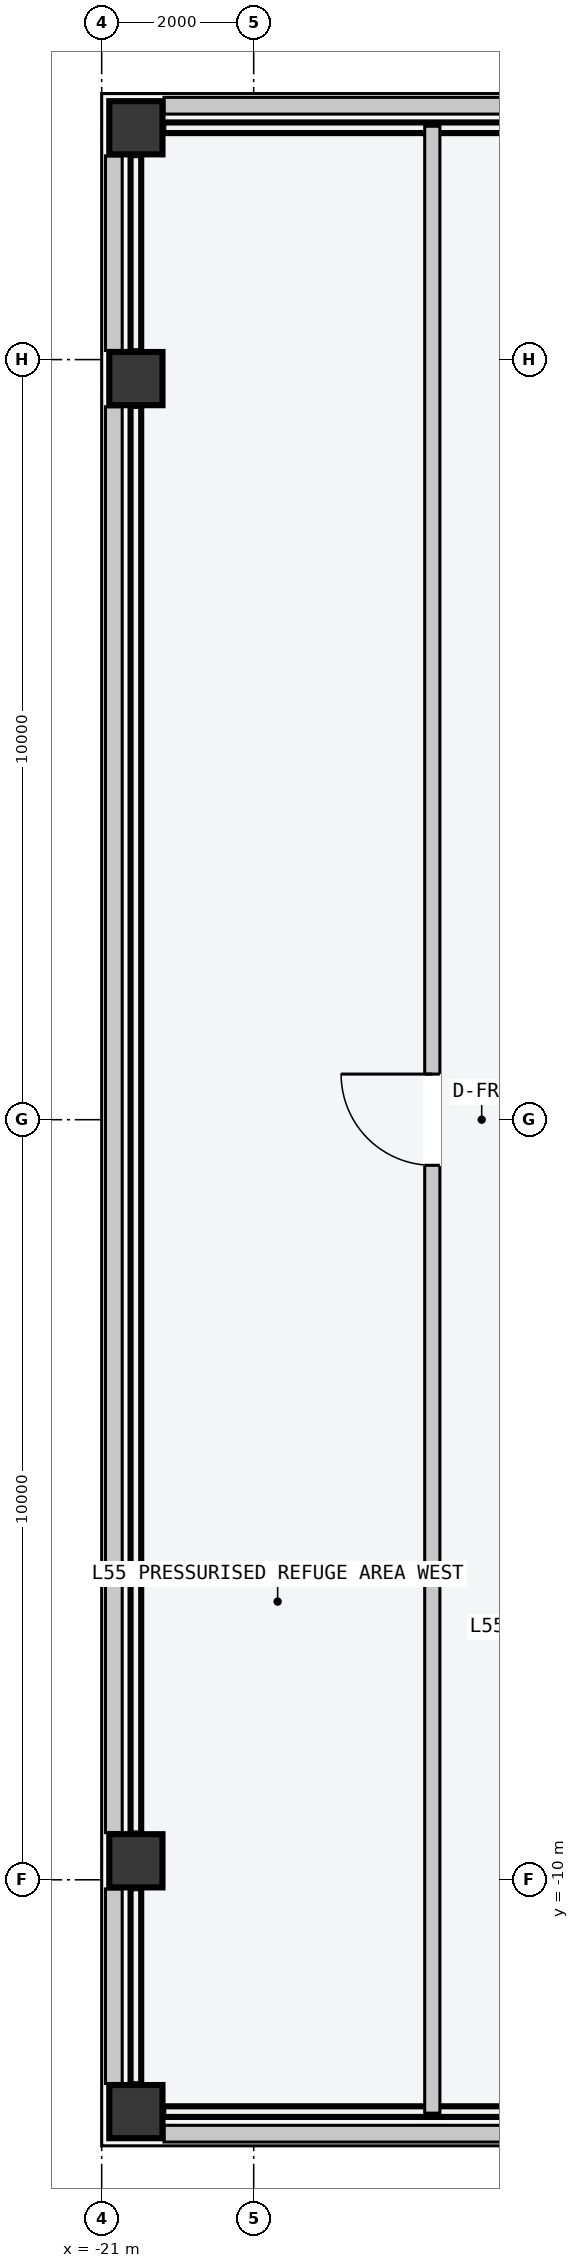
"""IFC4 building model, lengths in metres.
Left out: names, types, materials, properties, quantities, classifications, styles, units other than length and angle.
Written with IfcOpenShell. Run it as: python <this file> out.ifc"""

import sys

from ifc_helpers import new_model, si_unit, direction, frame, frame_2d, origin, origin_2d, place, context, subcontext, project, spatial, rectangle, hollow_rectangle, extrude, element, fill, save


model = new_model("IFC4")
c1 = context("Model", 3, precision=1e-05, world=origin(), true_north=direction((0.0, 1.0)))
c2 = subcontext(c1, "Body", "Model", "MODEL_VIEW")
j1 = project(units=[si_unit("LENGTHUNIT", "METRE"), si_unit("PLANEANGLEUNIT", "RADIAN")], contexts=[c1])
p1 = place(None, origin())
s1 = spatial("IfcSite", under=j1, at=p1, CompositionType="ELEMENT")
p2 = place(p1, origin())
s2 = spatial("IfcBuilding", under=s1, at=p2, CompositionType="ELEMENT")
p3 = place(p2, frame((0.0, 0.0, 209.1)))
s3 = spatial("IfcBuildingStorey", under=s2, at=p3, CompositionType="ELEMENT", Elevation=209.1)
for number, where, z_axis, x_axis in (
    (1, (-20.55, -13.05, 0.0), (0.0, 0.0, 1.0), (0.0, 1.0, 0.0)),
    (2, (-20.55, -9.75, 0.0), (0.0, 0.0, 1.0), (0.0, 1.0, 0.0)),
    (3, (-20.55, 9.75, 0.0), (0.0, 0.0, 1.0), (0.0, 1.0, 0.0)),
    (4, (-20.55, 13.05, 0.0), (0.0, 0.0, 1.0), (0.0, 1.0, 0.0)),
):
    element("IfcColumn", number, at=place(p3, frame(where, z_axis=z_axis, x_axis=x_axis)), inside=s3, PredefinedType="COLUMN", context=c2, shape_type="SweptSolid", body=[
        extrude(hollow_rectangle(XDim=0.7, YDim=0.7, WallThickness=0.03, at=origin_2d()), origin(), (0.0, 0.0, 1.0), 4.8),
    ])
p4 = place(p3, frame((-20.84, -12.68, 0.0), z_axis=(0.0, 0.0, 1.0), x_axis=(0.0, 1.0, 0.0)))
e5 = element("IfcWall", 5, at=p4, inside=s3, PredefinedType="PARAPET", context=c2, shape_type="SweptSolid", body=[
    extrude(rectangle(XDim=2.56, YDim=0.22, at=frame_2d((1.28, 0.0))), origin(), (0.0, 0.0, 1.0), 1.2),
])
p5 = place(p3, frame((-20.84, -9.38, 0.0), z_axis=(0.0, 0.0, 1.0), x_axis=(0.0, 1.0, 0.0)))
e6 = element("IfcWall", 6, at=p5, inside=s3, PredefinedType="PARAPET", context=c2, shape_type="SweptSolid", body=[
    extrude(rectangle(XDim=18.76, YDim=0.22, at=frame_2d((9.38, 0.0))), origin(), (0.0, 0.0, 1.0), 1.2),
])
p6 = place(p3, frame((-20.84, 10.12, 0.0), z_axis=(0.0, 0.0, 1.0), x_axis=(0.0, 1.0, 0.0)))
e7 = element("IfcWall", 7, at=p6, inside=s3, PredefinedType="PARAPET", context=c2, shape_type="SweptSolid", body=[
    extrude(rectangle(XDim=2.56, YDim=0.22, at=frame_2d((1.28, 0.0))), origin(), (0.0, 0.0, 1.0), 1.2),
])
for number, where, z_axis, x_axis in (
    (8, (-20.18, -13.34, 0.0), (0.0, 0.0, 1.0), (1.0, 0.0, 0.0)),
    (9, (-20.18, 13.34, 0.0), (0.0, 0.0, 1.0), (1.0, 0.0, 0.0)),
):
    element("IfcWall", number, at=place(p3, frame(where, z_axis=z_axis, x_axis=x_axis)), inside=s3, PredefinedType="PARAPET", context=c2, shape_type="SweptSolid", body=[
        extrude(rectangle(XDim=4.72, YDim=0.22, at=frame_2d((2.36, 0.0))), origin(), (0.0, 0.0, 1.0), 1.2),
    ])
p7 = place(p3, frame((-16.65, -13.07, 0.0), z_axis=(0.0, 0.0, 1.0), x_axis=(0.0, 1.0, 0.0)))
e10 = element("IfcWall", 10, at=p7, inside=s3, PredefinedType="PARTITIONING", context=c2, shape_type="SweptSolid", body=[
    extrude(rectangle(XDim=26.14, YDim=0.2, at=frame_2d((13.07, 0.0))), origin(), (0.0, 0.0, 1.0), 4.6),
])
p8 = place(p7, frame((12.47, 0.0, 0.0)))
e11 = element("IfcOpeningElement", 11, at=p8, cuts=e10, PredefinedType="OPENING", context=c2, shape_type="SweptSolid", body=[
    extrude(rectangle(XDim=1.2, YDim=2.22, at=frame_2d((0.6, 1.11))), frame((0.0, 0.11, 0.0), z_axis=(0.0, -1.0, 0.0), x_axis=(1.0, 0.0, 0.0)), (0.0, 0.0, 1.0), 0.22),
])
p9 = place(p8, origin())
e12 = element("IfcDoor", 12, at=p9, inside=s3, OperationType="SINGLE_SWING_RIGHT", PredefinedType="DOOR", context=c2, shape_type="SweptSolid", body=[
    extrude(rectangle(XDim=1.2, YDim=2.22, at=frame_2d((0.6, 1.11))), frame((0.0, 0.025, 0.0), z_axis=(0.0, -1.0, 0.0), x_axis=(1.0, 0.0, 0.0)), (0.0, 0.0, 1.0), 0.05),
])
fill(e11, e12)
save(model, sys.argv[1])
